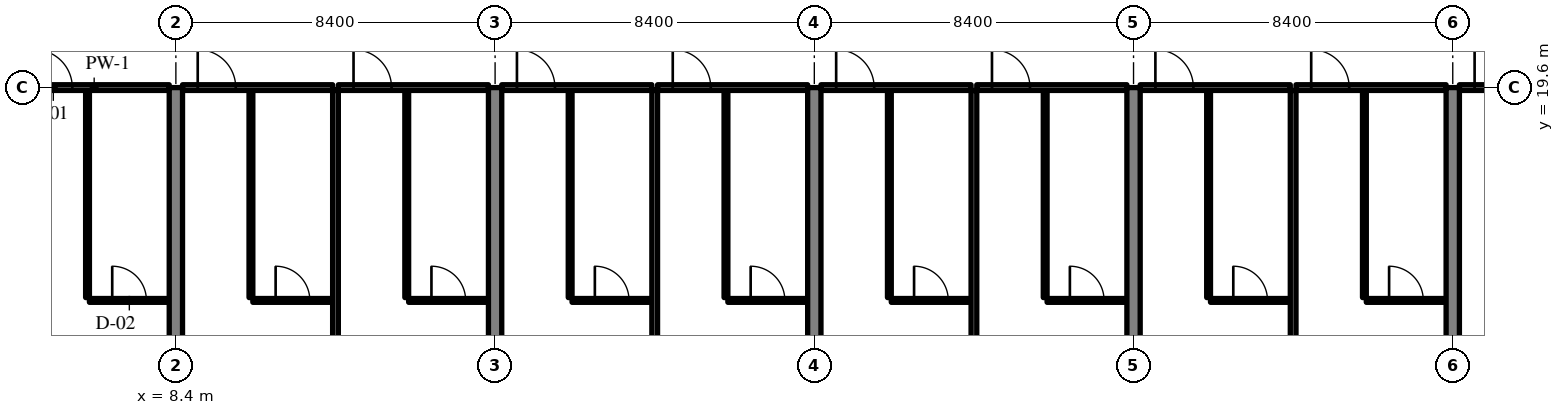
"""IFC4 building model, lengths in metres.
Left out: names, types, materials, properties, quantities, classifications, styles, units other than length and angle.
Written with IfcOpenShell. Run it as: python <this file> out.ifc"""

import sys

from ifc_helpers import new_model, si_unit, direction, frame, frame_2d, origin, place, context, subcontext, project, spatial, rectangle, extrude, source, transform, mapped, element, fill, save


model = new_model("IFC4")
c1 = context("Model", 3, precision=1e-05, world=origin(), true_north=direction((0.0, 1.0)))
c2 = subcontext(c1, "Body", "Model", "MODEL_VIEW")
j1 = project(units=[si_unit("LENGTHUNIT", "METRE"), si_unit("PLANEANGLEUNIT", "RADIAN")], contexts=[c1])
p1 = place(None, origin())
s1 = spatial("IfcSite", under=j1, at=p1, CompositionType="ELEMENT")
p2 = place(p1, origin())
s2 = spatial("IfcBuilding", under=s1, at=p2, CompositionType="ELEMENT")
p3 = place(p2, frame((0.0, 0.0, 106.6)))
s3 = spatial("IfcBuildingStorey", under=s2, at=p3, CompositionType="ELEMENT", Elevation=106.6)
m1 = source(origin(), c2, "Body", "SweptSolid", [
    extrude(rectangle(XDim=14.1, YDim=0.35, at=frame_2d((7.05, 0.0))), origin(), (0.0, 0.0, 1.0), 3.52),
])
for number, where, z_axis, x_axis in (
    (1, (8.4, 5.5, 0.0), (0.0, 0.0, 1.0), (0.0, 1.0, 0.0)),
    (2, (16.8, 5.5, 0.0), (0.0, 0.0, 1.0), (0.0, 1.0, 0.0)),
    (3, (25.2, 5.5, 0.0), (0.0, 0.0, 1.0), (0.0, 1.0, 0.0)),
    (4, (33.6, 5.5, 0.0), (0.0, 0.0, 1.0), (0.0, 1.0, 0.0)),
    (5, (42.0, 5.5, 0.0), (0.0, 0.0, 1.0), (0.0, 1.0, 0.0)),
):
    element("IfcWall", number, at=place(p3, frame(where, z_axis=z_axis, x_axis=x_axis)), inside=s3, PredefinedType="SHEAR", context=c2, shape_type="MappedRepresentation", body=[
        mapped(m1, transform((0.0, 0.0, 0.0), scale=1.0)),
    ])
m2 = source(origin(), c2, "Body", "SweptSolid", [
    extrude(rectangle(XDim=5.45, YDim=0.1, at=frame_2d((2.725, 0.0))), origin(), (0.0, 0.0, 1.0), 3.52),
])
p4 = place(p3, frame((6.075, 14.075, 0.0), z_axis=(0.0, 0.0, 1.0), x_axis=(0.0, 1.0, 0.0)))
e6 = element("IfcWall", 6, at=p4, inside=s3, PredefinedType="PARTITIONING", context=c2, shape_type="MappedRepresentation", body=[
    mapped(m2, transform((0.0, 0.0, 0.0), scale=1.0)),
])
m3 = source(origin(), c2, "Body", "SweptSolid", [
    extrude(rectangle(XDim=2.1, YDim=0.1, at=frame_2d((1.05, 0.0))), origin(), (0.0, 0.0, 1.0), 3.52),
])
p5 = place(p3, frame((6.125, 14.0, 0.0), z_axis=(0.0, 0.0, 1.0), x_axis=(1.0, 0.0, 0.0)))
e7 = element("IfcWall", 7, at=p5, inside=s3, PredefinedType="PARTITIONING", context=c2, shape_type="MappedRepresentation", body=[
    mapped(m3, transform((0.0, 0.0, 0.0), scale=1.0)),
])
m4 = source(origin(), c2, "Body", "SweptSolid", [
    extrude(rectangle(XDim=0.9, YDim=2.1, at=frame_2d((0.45, 1.05))), frame((0.0, 0.06, 0.0), z_axis=(0.0, -1.0, 0.0), x_axis=(1.0, 0.0, 0.0)), (0.0, 0.0, 1.0), 0.12),
])
p6 = place(p5, frame((0.6, 0.0, 0.0)))
e8 = element("IfcOpeningElement", 8, at=p6, cuts=e7, PredefinedType="OPENING", context=c2, shape_type="MappedRepresentation", body=[
    mapped(m4, transform((0.0, 0.0, 0.0), scale=1.0)),
])
m5 = source(origin(), c2, "Body", "SweptSolid", [
    extrude(rectangle(XDim=3.95, YDim=0.15, at=frame_2d((1.975, 0.0))), origin(), (0.0, 0.0, 1.0), 2.82),
])
p7 = place(p3, frame((4.275, 19.6, 0.0), z_axis=(0.0, 0.0, 1.0), x_axis=(1.0, 0.0, 0.0)))
e9 = element("IfcWall", 9, at=p7, inside=s3, PredefinedType="PARTITIONING", context=c2, shape_type="MappedRepresentation", body=[
    mapped(m5, transform((0.0, 0.0, 0.0), scale=1.0)),
])
m6 = source(origin(), c2, "Body", "SweptSolid", [
    extrude(rectangle(XDim=1.0, YDim=2.1, at=frame_2d((0.5, 1.05))), frame((0.0, 0.085, 0.0), z_axis=(0.0, -1.0, 0.0), x_axis=(1.0, 0.0, 0.0)), (0.0, 0.0, 1.0), 0.17),
])
p8 = place(p7, frame((0.4, 0.0, 0.0)))
e10 = element("IfcOpeningElement", 10, at=p8, cuts=e9, PredefinedType="OPENING", context=c2, shape_type="MappedRepresentation", body=[
    mapped(m6, transform((0.0, 0.0, 0.0), scale=1.0)),
])
p9 = place(p3, frame((10.375, 14.075, 0.0), z_axis=(0.0, 0.0, 1.0), x_axis=(0.0, 1.0, 0.0)))
e11 = element("IfcWall", 11, at=p9, inside=s3, PredefinedType="PARTITIONING", context=c2, shape_type="MappedRepresentation", body=[
    mapped(m2, transform((0.0, 0.0, 0.0), scale=1.0)),
])
m7 = source(origin(), c2, "Body", "SweptSolid", [
    extrude(rectangle(XDim=2.1, YDim=0.1, at=frame_2d((1.05, 0.0))), origin(), (0.0, 0.0, 1.0), 3.52),
])
p10 = place(p3, frame((10.425, 14.0, 0.0), z_axis=(0.0, 0.0, 1.0), x_axis=(1.0, 0.0, 0.0)))
e12 = element("IfcWall", 12, at=p10, inside=s3, PredefinedType="PARTITIONING", context=c2, shape_type="MappedRepresentation", body=[
    mapped(m7, transform((0.0, 0.0, 0.0), scale=1.0)),
])
p11 = place(p10, frame((0.6, 0.0, 0.0)))
e13 = element("IfcOpeningElement", 13, at=p11, cuts=e12, PredefinedType="OPENING", context=c2, shape_type="MappedRepresentation", body=[
    mapped(m4, transform((0.0, 0.0, 0.0), scale=1.0)),
])
m8 = source(origin(), c2, "Body", "SweptSolid", [
    extrude(rectangle(XDim=3.95, YDim=0.15, at=frame_2d((1.975, 0.0))), origin(), (0.0, 0.0, 1.0), 2.82),
])
p12 = place(p3, frame((8.575, 19.6, 0.0), z_axis=(0.0, 0.0, 1.0), x_axis=(1.0, 0.0, 0.0)))
e14 = element("IfcWall", 14, at=p12, inside=s3, PredefinedType="PARTITIONING", context=c2, shape_type="MappedRepresentation", body=[
    mapped(m8, transform((0.0, 0.0, 0.0), scale=1.0)),
])
p13 = place(p12, frame((0.4, 0.0, 0.0)))
e15 = element("IfcOpeningElement", 15, at=p13, cuts=e14, PredefinedType="OPENING", context=c2, shape_type="MappedRepresentation", body=[
    mapped(m6, transform((0.0, 0.0, 0.0), scale=1.0)),
])
p14 = place(p3, frame((14.475, 14.075, 0.0), z_axis=(0.0, 0.0, 1.0), x_axis=(0.0, 1.0, 0.0)))
e16 = element("IfcWall", 16, at=p14, inside=s3, PredefinedType="PARTITIONING", context=c2, shape_type="MappedRepresentation", body=[
    mapped(m2, transform((0.0, 0.0, 0.0), scale=1.0)),
])
p15 = place(p3, frame((14.525, 14.0, 0.0), z_axis=(0.0, 0.0, 1.0), x_axis=(1.0, 0.0, 0.0)))
e17 = element("IfcWall", 17, at=p15, inside=s3, PredefinedType="PARTITIONING", context=c2, shape_type="MappedRepresentation", body=[
    mapped(m3, transform((0.0, 0.0, 0.0), scale=1.0)),
])
p16 = place(p15, frame((0.6, 0.0, 0.0)))
e18 = element("IfcOpeningElement", 18, at=p16, cuts=e17, PredefinedType="OPENING", context=c2, shape_type="MappedRepresentation", body=[
    mapped(m4, transform((0.0, 0.0, 0.0), scale=1.0)),
])
p17 = place(p3, frame((12.675, 19.6, 0.0), z_axis=(0.0, 0.0, 1.0), x_axis=(1.0, 0.0, 0.0)))
e19 = element("IfcWall", 19, at=p17, inside=s3, PredefinedType="PARTITIONING", context=c2, shape_type="MappedRepresentation", body=[
    mapped(m8, transform((0.0, 0.0, 0.0), scale=1.0)),
])
p18 = place(p17, frame((0.4, 0.0, 0.0)))
e20 = element("IfcOpeningElement", 20, at=p18, cuts=e19, PredefinedType="OPENING", context=c2, shape_type="MappedRepresentation", body=[
    mapped(m6, transform((0.0, 0.0, 0.0), scale=1.0)),
])
m9 = source(origin(), c2, "Body", "SweptSolid", [
    extrude(rectangle(XDim=13.575, YDim=0.15, at=frame_2d((6.788, 0.0))), origin(), (0.0, 0.0, 1.0), 3.52),
])
p19 = place(p3, frame((12.6, 5.95, 0.0), z_axis=(0.0, 0.0, 1.0), x_axis=(0.0, 1.0, 0.0)))
e21 = element("IfcWall", 21, at=p19, inside=s3, PredefinedType="PARTITIONING", context=c2, shape_type="MappedRepresentation", body=[
    mapped(m9, transform((0.0, 0.0, 0.0), scale=1.0)),
])
p20 = place(p3, frame((18.775, 14.075, 0.0), z_axis=(0.0, 0.0, 1.0), x_axis=(0.0, 1.0, 0.0)))
e22 = element("IfcWall", 22, at=p20, inside=s3, PredefinedType="PARTITIONING", context=c2, shape_type="MappedRepresentation", body=[
    mapped(m2, transform((0.0, 0.0, 0.0), scale=1.0)),
])
p21 = place(p3, frame((18.825, 14.0, 0.0), z_axis=(0.0, 0.0, 1.0), x_axis=(1.0, 0.0, 0.0)))
e23 = element("IfcWall", 23, at=p21, inside=s3, PredefinedType="PARTITIONING", context=c2, shape_type="MappedRepresentation", body=[
    mapped(m3, transform((0.0, 0.0, 0.0), scale=1.0)),
])
p22 = place(p21, frame((0.6, 0.0, 0.0)))
e24 = element("IfcOpeningElement", 24, at=p22, cuts=e23, PredefinedType="OPENING", context=c2, shape_type="MappedRepresentation", body=[
    mapped(m4, transform((0.0, 0.0, 0.0), scale=1.0)),
])
p23 = place(p3, frame((16.975, 19.6, 0.0), z_axis=(0.0, 0.0, 1.0), x_axis=(1.0, 0.0, 0.0)))
e25 = element("IfcWall", 25, at=p23, inside=s3, PredefinedType="PARTITIONING", context=c2, shape_type="MappedRepresentation", body=[
    mapped(m8, transform((0.0, 0.0, 0.0), scale=1.0)),
])
p24 = place(p23, frame((0.4, 0.0, 0.0)))
e26 = element("IfcOpeningElement", 26, at=p24, cuts=e25, PredefinedType="OPENING", context=c2, shape_type="MappedRepresentation", body=[
    mapped(m6, transform((0.0, 0.0, 0.0), scale=1.0)),
])
p25 = place(p3, frame((22.875, 14.075, 0.0), z_axis=(0.0, 0.0, 1.0), x_axis=(0.0, 1.0, 0.0)))
e27 = element("IfcWall", 27, at=p25, inside=s3, PredefinedType="PARTITIONING", context=c2, shape_type="MappedRepresentation", body=[
    mapped(m2, transform((0.0, 0.0, 0.0), scale=1.0)),
])
p26 = place(p3, frame((22.925, 14.0, 0.0), z_axis=(0.0, 0.0, 1.0), x_axis=(1.0, 0.0, 0.0)))
e28 = element("IfcWall", 28, at=p26, inside=s3, PredefinedType="PARTITIONING", context=c2, shape_type="MappedRepresentation", body=[
    mapped(m7, transform((0.0, 0.0, 0.0), scale=1.0)),
])
p27 = place(p26, frame((0.6, 0.0, 0.0)))
e29 = element("IfcOpeningElement", 29, at=p27, cuts=e28, PredefinedType="OPENING", context=c2, shape_type="MappedRepresentation", body=[
    mapped(m4, transform((0.0, 0.0, 0.0), scale=1.0)),
])
p28 = place(p3, frame((21.075, 19.6, 0.0), z_axis=(0.0, 0.0, 1.0), x_axis=(1.0, 0.0, 0.0)))
e30 = element("IfcWall", 30, at=p28, inside=s3, PredefinedType="PARTITIONING", context=c2, shape_type="MappedRepresentation", body=[
    mapped(m8, transform((0.0, 0.0, 0.0), scale=1.0)),
])
p29 = place(p28, frame((0.4, 0.0, 0.0)))
e31 = element("IfcOpeningElement", 31, at=p29, cuts=e30, PredefinedType="OPENING", context=c2, shape_type="MappedRepresentation", body=[
    mapped(m6, transform((0.0, 0.0, 0.0), scale=1.0)),
])
m10 = source(origin(), c2, "Body", "SweptSolid", [
    extrude(rectangle(XDim=12.275, YDim=0.15, at=frame_2d((6.137, 0.0))), origin(), (0.0, 0.0, 1.0), 3.52),
])
p30 = place(p3, frame((21.0, 7.25, 0.0), z_axis=(0.0, 0.0, 1.0), x_axis=(0.0, 1.0, 0.0)))
e32 = element("IfcWall", 32, at=p30, inside=s3, PredefinedType="PARTITIONING", context=c2, shape_type="MappedRepresentation", body=[
    mapped(m10, transform((0.0, 0.0, 0.0), scale=1.0)),
])
p31 = place(p3, frame((27.175, 14.075, 0.0), z_axis=(0.0, 0.0, 1.0), x_axis=(0.0, 1.0, 0.0)))
e33 = element("IfcWall", 33, at=p31, inside=s3, PredefinedType="PARTITIONING", context=c2, shape_type="MappedRepresentation", body=[
    mapped(m2, transform((0.0, 0.0, 0.0), scale=1.0)),
])
p32 = place(p3, frame((27.225, 14.0, 0.0), z_axis=(0.0, 0.0, 1.0), x_axis=(1.0, 0.0, 0.0)))
e34 = element("IfcWall", 34, at=p32, inside=s3, PredefinedType="PARTITIONING", context=c2, shape_type="MappedRepresentation", body=[
    mapped(m7, transform((0.0, 0.0, 0.0), scale=1.0)),
])
p33 = place(p32, frame((0.6, 0.0, 0.0)))
e35 = element("IfcOpeningElement", 35, at=p33, cuts=e34, PredefinedType="OPENING", context=c2, shape_type="MappedRepresentation", body=[
    mapped(m4, transform((0.0, 0.0, 0.0), scale=1.0)),
])
p34 = place(p3, frame((25.375, 19.6, 0.0), z_axis=(0.0, 0.0, 1.0), x_axis=(1.0, 0.0, 0.0)))
e36 = element("IfcWall", 36, at=p34, inside=s3, PredefinedType="PARTITIONING", context=c2, shape_type="MappedRepresentation", body=[
    mapped(m8, transform((0.0, 0.0, 0.0), scale=1.0)),
])
p35 = place(p34, frame((0.4, 0.0, 0.0)))
e37 = element("IfcOpeningElement", 37, at=p35, cuts=e36, PredefinedType="OPENING", context=c2, shape_type="MappedRepresentation", body=[
    mapped(m6, transform((0.0, 0.0, 0.0), scale=1.0)),
])
p36 = place(p3, frame((31.275, 14.075, 0.0), z_axis=(0.0, 0.0, 1.0), x_axis=(0.0, 1.0, 0.0)))
e38 = element("IfcWall", 38, at=p36, inside=s3, PredefinedType="PARTITIONING", context=c2, shape_type="MappedRepresentation", body=[
    mapped(m2, transform((0.0, 0.0, 0.0), scale=1.0)),
])
p37 = place(p3, frame((31.325, 14.0, 0.0), z_axis=(0.0, 0.0, 1.0), x_axis=(1.0, 0.0, 0.0)))
e39 = element("IfcWall", 39, at=p37, inside=s3, PredefinedType="PARTITIONING", context=c2, shape_type="MappedRepresentation", body=[
    mapped(m3, transform((0.0, 0.0, 0.0), scale=1.0)),
])
p38 = place(p37, frame((0.6, 0.0, 0.0)))
e40 = element("IfcOpeningElement", 40, at=p38, cuts=e39, PredefinedType="OPENING", context=c2, shape_type="MappedRepresentation", body=[
    mapped(m4, transform((0.0, 0.0, 0.0), scale=1.0)),
])
p39 = place(p3, frame((29.475, 19.6, 0.0), z_axis=(0.0, 0.0, 1.0), x_axis=(1.0, 0.0, 0.0)))
e41 = element("IfcWall", 41, at=p39, inside=s3, PredefinedType="PARTITIONING", context=c2, shape_type="MappedRepresentation", body=[
    mapped(m8, transform((0.0, 0.0, 0.0), scale=1.0)),
])
p40 = place(p39, frame((0.4, 0.0, 0.0)))
e42 = element("IfcOpeningElement", 42, at=p40, cuts=e41, PredefinedType="OPENING", context=c2, shape_type="MappedRepresentation", body=[
    mapped(m6, transform((0.0, 0.0, 0.0), scale=1.0)),
])
p41 = place(p3, frame((29.4, 7.25, 0.0), z_axis=(0.0, 0.0, 1.0), x_axis=(0.0, 1.0, 0.0)))
e43 = element("IfcWall", 43, at=p41, inside=s3, PredefinedType="PARTITIONING", context=c2, shape_type="MappedRepresentation", body=[
    mapped(m10, transform((0.0, 0.0, 0.0), scale=1.0)),
])
p42 = place(p3, frame((35.575, 14.075, 0.0), z_axis=(0.0, 0.0, 1.0), x_axis=(0.0, 1.0, 0.0)))
e44 = element("IfcWall", 44, at=p42, inside=s3, PredefinedType="PARTITIONING", context=c2, shape_type="MappedRepresentation", body=[
    mapped(m2, transform((0.0, 0.0, 0.0), scale=1.0)),
])
p43 = place(p3, frame((35.625, 14.0, 0.0), z_axis=(0.0, 0.0, 1.0), x_axis=(1.0, 0.0, 0.0)))
e45 = element("IfcWall", 45, at=p43, inside=s3, PredefinedType="PARTITIONING", context=c2, shape_type="MappedRepresentation", body=[
    mapped(m3, transform((0.0, 0.0, 0.0), scale=1.0)),
])
p44 = place(p43, frame((0.6, 0.0, 0.0)))
e46 = element("IfcOpeningElement", 46, at=p44, cuts=e45, PredefinedType="OPENING", context=c2, shape_type="MappedRepresentation", body=[
    mapped(m4, transform((0.0, 0.0, 0.0), scale=1.0)),
])
p45 = place(p3, frame((33.775, 19.6, 0.0), z_axis=(0.0, 0.0, 1.0), x_axis=(1.0, 0.0, 0.0)))
e47 = element("IfcWall", 47, at=p45, inside=s3, PredefinedType="PARTITIONING", context=c2, shape_type="MappedRepresentation", body=[
    mapped(m5, transform((0.0, 0.0, 0.0), scale=1.0)),
])
p46 = place(p45, frame((0.4, 0.0, 0.0)))
e48 = element("IfcOpeningElement", 48, at=p46, cuts=e47, PredefinedType="OPENING", context=c2, shape_type="MappedRepresentation", body=[
    mapped(m6, transform((0.0, 0.0, 0.0), scale=1.0)),
])
p47 = place(p3, frame((39.675, 14.075, 0.0), z_axis=(0.0, 0.0, 1.0), x_axis=(0.0, 1.0, 0.0)))
e49 = element("IfcWall", 49, at=p47, inside=s3, PredefinedType="PARTITIONING", context=c2, shape_type="MappedRepresentation", body=[
    mapped(m2, transform((0.0, 0.0, 0.0), scale=1.0)),
])
p48 = place(p3, frame((39.725, 14.0, 0.0), z_axis=(0.0, 0.0, 1.0), x_axis=(1.0, 0.0, 0.0)))
e50 = element("IfcWall", 50, at=p48, inside=s3, PredefinedType="PARTITIONING", context=c2, shape_type="MappedRepresentation", body=[
    mapped(m7, transform((0.0, 0.0, 0.0), scale=1.0)),
])
p49 = place(p48, frame((0.6, 0.0, 0.0)))
e51 = element("IfcOpeningElement", 51, at=p49, cuts=e50, PredefinedType="OPENING", context=c2, shape_type="MappedRepresentation", body=[
    mapped(m4, transform((0.0, 0.0, 0.0), scale=1.0)),
])
p50 = place(p3, frame((37.875, 19.6, 0.0), z_axis=(0.0, 0.0, 1.0), x_axis=(1.0, 0.0, 0.0)))
e52 = element("IfcWall", 52, at=p50, inside=s3, PredefinedType="PARTITIONING", context=c2, shape_type="MappedRepresentation", body=[
    mapped(m8, transform((0.0, 0.0, 0.0), scale=1.0)),
])
p51 = place(p50, frame((0.4, 0.0, 0.0)))
e53 = element("IfcOpeningElement", 53, at=p51, cuts=e52, PredefinedType="OPENING", context=c2, shape_type="MappedRepresentation", body=[
    mapped(m6, transform((0.0, 0.0, 0.0), scale=1.0)),
])
m11 = source(origin(), c2, "Body", "SweptSolid", [
    extrude(rectangle(XDim=15.498, YDim=0.15, at=frame_2d((7.749, 0.0))), origin(), (0.0, 0.0, 1.0), 3.52),
])
p52 = place(p3, frame((37.8, 4.027, 0.0), z_axis=(0.0, 0.0, 1.0), x_axis=(0.0, 1.0, 0.0)))
e54 = element("IfcWall", 54, at=p52, inside=s3, PredefinedType="PARTITIONING", context=c2, shape_type="MappedRepresentation", body=[
    mapped(m11, transform((0.0, 0.0, 0.0), scale=1.0)),
])
p53 = place(p3, frame((42.175, 19.6, 0.0), z_axis=(0.0, 0.0, 1.0), x_axis=(1.0, 0.0, 0.0)))
e55 = element("IfcWall", 55, at=p53, inside=s3, PredefinedType="PARTITIONING", context=c2, shape_type="MappedRepresentation", body=[
    mapped(m8, transform((0.0, 0.0, 0.0), scale=1.0)),
])
p54 = place(p53, frame((0.4, 0.0, 0.0)))
e56 = element("IfcOpeningElement", 56, at=p54, cuts=e55, PredefinedType="OPENING", context=c2, shape_type="MappedRepresentation", body=[
    mapped(m6, transform((0.0, 0.0, 0.0), scale=1.0)),
])
m12 = source(origin(), c2, "Body", "SweptSolid", [
    extrude(rectangle(XDim=0.9, YDim=2.1, at=frame_2d((0.45, 1.05))), frame((0.0, 0.025, 0.0), z_axis=(0.0, -1.0, 0.0), x_axis=(1.0, 0.0, 0.0)), (0.0, 0.0, 1.0), 0.05),
])
p55 = place(p6, origin())
e57 = element("IfcDoor", 57, at=p55, inside=s3, OperationType="SINGLE_SWING_LEFT", PredefinedType="DOOR", context=c2, shape_type="MappedRepresentation", body=[
    mapped(m12, transform((0.0, 0.0, 0.0), scale=1.0)),
])
fill(e8, e57)
m13 = source(origin(), c2, "Body", "SweptSolid", [
    extrude(rectangle(XDim=1.0, YDim=2.1, at=frame_2d((0.5, 1.05))), frame((0.0, 0.025, 0.0), z_axis=(0.0, -1.0, 0.0), x_axis=(1.0, 0.0, 0.0)), (0.0, 0.0, 1.0), 0.05),
])
p56 = place(p8, origin())
e58 = element("IfcDoor", 58, at=p56, inside=s3, OperationType="SINGLE_SWING_LEFT", PredefinedType="DOOR", context=c2, shape_type="MappedRepresentation", body=[
    mapped(m13, transform((0.0, 0.0, 0.0), scale=1.0)),
])
fill(e10, e58)
p57 = place(p11, origin())
e59 = element("IfcDoor", 59, at=p57, inside=s3, OperationType="SINGLE_SWING_LEFT", PredefinedType="DOOR", context=c2, shape_type="MappedRepresentation", body=[
    mapped(m12, transform((0.0, 0.0, 0.0), scale=1.0)),
])
fill(e13, e59)
p58 = place(p13, origin())
e60 = element("IfcDoor", 60, at=p58, inside=s3, OperationType="SINGLE_SWING_LEFT", PredefinedType="DOOR", context=c2, shape_type="MappedRepresentation", body=[
    mapped(m13, transform((0.0, 0.0, 0.0), scale=1.0)),
])
fill(e15, e60)
p59 = place(p16, origin())
e61 = element("IfcDoor", 61, at=p59, inside=s3, OperationType="SINGLE_SWING_LEFT", PredefinedType="DOOR", context=c2, shape_type="MappedRepresentation", body=[
    mapped(m12, transform((0.0, 0.0, 0.0), scale=1.0)),
])
fill(e18, e61)
p60 = place(p18, origin())
e62 = element("IfcDoor", 62, at=p60, inside=s3, OperationType="SINGLE_SWING_LEFT", PredefinedType="DOOR", context=c2, shape_type="MappedRepresentation", body=[
    mapped(m13, transform((0.0, 0.0, 0.0), scale=1.0)),
])
fill(e20, e62)
p61 = place(p22, origin())
e63 = element("IfcDoor", 63, at=p61, inside=s3, OperationType="SINGLE_SWING_LEFT", PredefinedType="DOOR", context=c2, shape_type="MappedRepresentation", body=[
    mapped(m12, transform((0.0, 0.0, 0.0), scale=1.0)),
])
fill(e24, e63)
p62 = place(p24, origin())
e64 = element("IfcDoor", 64, at=p62, inside=s3, OperationType="SINGLE_SWING_LEFT", PredefinedType="DOOR", context=c2, shape_type="MappedRepresentation", body=[
    mapped(m13, transform((0.0, 0.0, 0.0), scale=1.0)),
])
fill(e26, e64)
p63 = place(p27, origin())
e65 = element("IfcDoor", 65, at=p63, inside=s3, OperationType="SINGLE_SWING_LEFT", PredefinedType="DOOR", context=c2, shape_type="MappedRepresentation", body=[
    mapped(m12, transform((0.0, 0.0, 0.0), scale=1.0)),
])
fill(e29, e65)
p64 = place(p29, origin())
e66 = element("IfcDoor", 66, at=p64, inside=s3, OperationType="SINGLE_SWING_LEFT", PredefinedType="DOOR", context=c2, shape_type="MappedRepresentation", body=[
    mapped(m13, transform((0.0, 0.0, 0.0), scale=1.0)),
])
fill(e31, e66)
p65 = place(p33, origin())
e67 = element("IfcDoor", 67, at=p65, inside=s3, OperationType="SINGLE_SWING_LEFT", PredefinedType="DOOR", context=c2, shape_type="MappedRepresentation", body=[
    mapped(m12, transform((0.0, 0.0, 0.0), scale=1.0)),
])
fill(e35, e67)
p66 = place(p35, origin())
e68 = element("IfcDoor", 68, at=p66, inside=s3, OperationType="SINGLE_SWING_LEFT", PredefinedType="DOOR", context=c2, shape_type="MappedRepresentation", body=[
    mapped(m13, transform((0.0, 0.0, 0.0), scale=1.0)),
])
fill(e37, e68)
p67 = place(p38, origin())
e69 = element("IfcDoor", 69, at=p67, inside=s3, OperationType="SINGLE_SWING_LEFT", PredefinedType="DOOR", context=c2, shape_type="MappedRepresentation", body=[
    mapped(m12, transform((0.0, 0.0, 0.0), scale=1.0)),
])
fill(e40, e69)
p68 = place(p40, origin())
e70 = element("IfcDoor", 70, at=p68, inside=s3, OperationType="SINGLE_SWING_LEFT", PredefinedType="DOOR", context=c2, shape_type="MappedRepresentation", body=[
    mapped(m13, transform((0.0, 0.0, 0.0), scale=1.0)),
])
fill(e42, e70)
p69 = place(p44, origin())
e71 = element("IfcDoor", 71, at=p69, inside=s3, OperationType="SINGLE_SWING_LEFT", PredefinedType="DOOR", context=c2, shape_type="MappedRepresentation", body=[
    mapped(m12, transform((0.0, 0.0, 0.0), scale=1.0)),
])
fill(e46, e71)
p70 = place(p46, origin())
e72 = element("IfcDoor", 72, at=p70, inside=s3, OperationType="SINGLE_SWING_LEFT", PredefinedType="DOOR", context=c2, shape_type="MappedRepresentation", body=[
    mapped(m13, transform((0.0, 0.0, 0.0), scale=1.0)),
])
fill(e48, e72)
p71 = place(p49, origin())
e73 = element("IfcDoor", 73, at=p71, inside=s3, OperationType="SINGLE_SWING_LEFT", PredefinedType="DOOR", context=c2, shape_type="MappedRepresentation", body=[
    mapped(m12, transform((0.0, 0.0, 0.0), scale=1.0)),
])
fill(e51, e73)
p72 = place(p51, origin())
e74 = element("IfcDoor", 74, at=p72, inside=s3, OperationType="SINGLE_SWING_LEFT", PredefinedType="DOOR", context=c2, shape_type="MappedRepresentation", body=[
    mapped(m13, transform((0.0, 0.0, 0.0), scale=1.0)),
])
fill(e53, e74)
p73 = place(p54, origin())
e75 = element("IfcDoor", 75, at=p73, inside=s3, OperationType="SINGLE_SWING_LEFT", PredefinedType="DOOR", context=c2, shape_type="MappedRepresentation", body=[
    mapped(m13, transform((0.0, 0.0, 0.0), scale=1.0)),
])
fill(e56, e75)
save(model, sys.argv[1])
